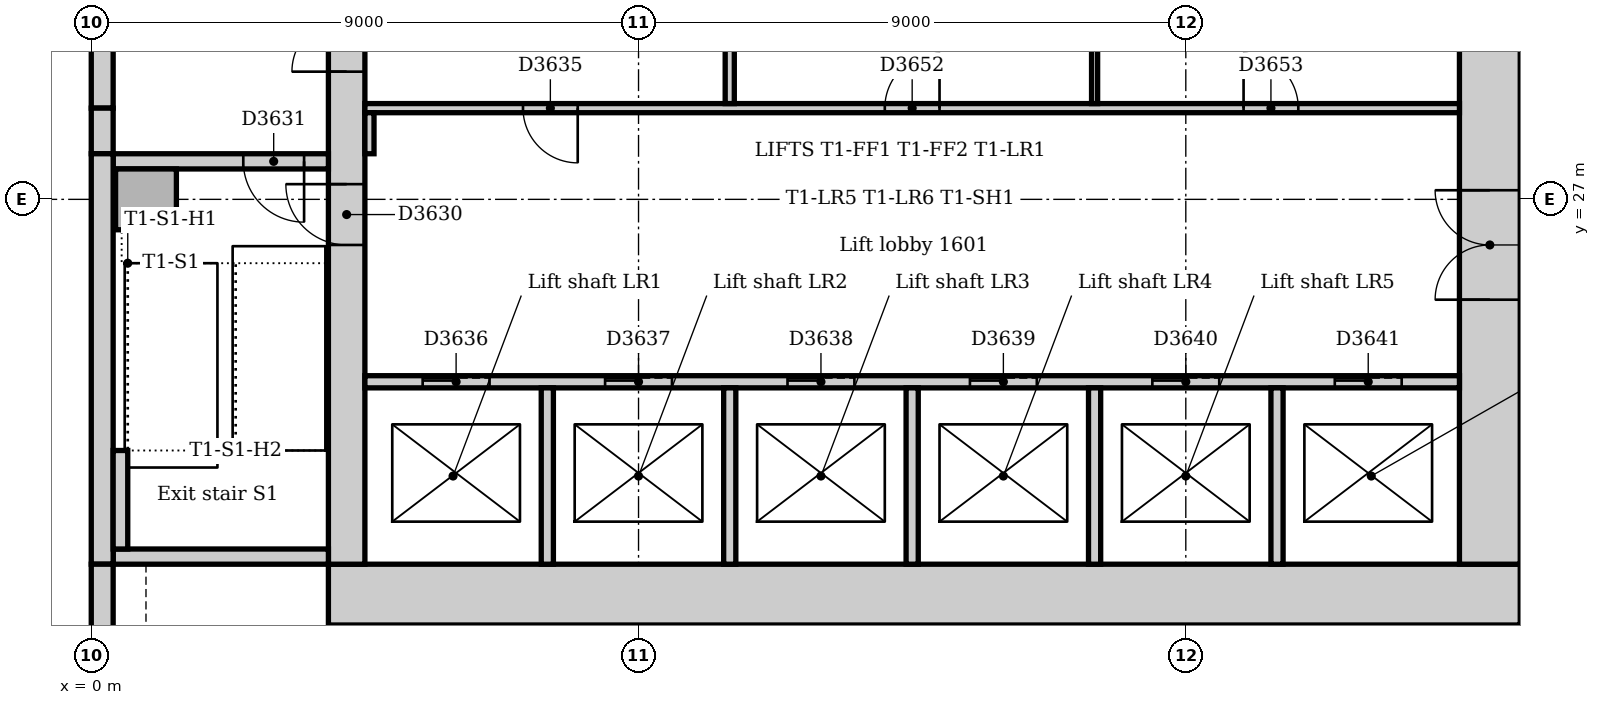
"""IFC4 building model, lengths in metres.
Left out: names, types, materials, properties, quantities, classifications, styles, units other than length and angle.
Written with IfcOpenShell. Run it as: python <this file> out.ifc"""

import sys

from ifc_helpers import new_model, si_unit, direction, frame, frame_2d, origin, origin_2d, place, context, subcontext, project, spatial, rectangle, extrude, element, fill, save


model = new_model("IFC4")
c1 = context("Model", 3, precision=1e-05, world=origin(), true_north=direction((0.0, 1.0)))
c2 = subcontext(c1, "Body", "Model", "MODEL_VIEW")
j1 = project(units=[si_unit("LENGTHUNIT", "METRE"), si_unit("PLANEANGLEUNIT", "RADIAN")], contexts=[c1])
p1 = place(None, origin())
s1 = spatial("IfcSite", under=j1, at=p1, CompositionType="ELEMENT")
p2 = place(p1, origin())
s2 = spatial("IfcBuilding", under=s1, at=p2, CompositionType="ELEMENT")
p3 = place(p2, frame((0.0, 0.0, 71.0)))
s3 = spatial("IfcBuildingStorey", under=s2, at=p3, CompositionType="ELEMENT", Elevation=71.0)
p4 = place(p3, frame((3.9, 20.5, 0.0), z_axis=(0.0, 0.0, 1.0), x_axis=(1.0, 0.0, 0.0)))
e1 = element("IfcWall", 1, at=p4, inside=s3, PredefinedType="SOLIDWALL", context=c2, shape_type="SweptSolid", body=[
    extrude(rectangle(XDim=19.6, YDim=1.0, at=frame_2d((9.8, 0.0))), origin(), (0.0, 0.0, 1.0), 4.0),
])
p5 = place(p3, frame((23.0, 21.0, 0.0), z_axis=(0.0, 0.0, 1.0), x_axis=(0.0, 1.0, 0.0)))
e2 = element("IfcWall", 2, at=p5, inside=s3, PredefinedType="SOLIDWALL", context=c2, shape_type="SweptSolid", body=[
    extrude(rectangle(XDim=10.5, YDim=1.0, at=frame_2d((5.25, 0.0))), origin(), (0.0, 0.0, 1.0), 4.0),
])
p6 = place(p5, frame((4.35, 0.0, 0.0)))
e3 = element("IfcOpeningElement", 3, at=p6, cuts=e2, PredefinedType="OPENING", context=c2, shape_type="SweptSolid", body=[
    extrude(rectangle(XDim=1.8, YDim=2.1, at=frame_2d((0.9, 1.05))), frame((0.0, 0.51, 0.0), z_axis=(0.0, -1.0, 0.0), x_axis=(1.0, 0.0, 0.0)), (0.0, 0.0, 1.0), 1.02),
])
p7 = place(p3, frame((4.2, 31.5, 0.0), z_axis=(0.0, 0.0, 1.0), x_axis=(0.0, -1.0, 0.0)))
e4 = element("IfcWall", 4, at=p7, inside=s3, PredefinedType="SOLIDWALL", context=c2, shape_type="SweptSolid", body=[
    extrude(rectangle(XDim=10.5, YDim=0.6, at=frame_2d((5.25, 0.0))), origin(), (0.0, 0.0, 1.0), 4.0),
])
p8 = place(p7, frame((4.25, 0.0, 0.0)))
e5 = element("IfcOpeningElement", 5, at=p8, cuts=e4, PredefinedType="OPENING", context=c2, shape_type="SweptSolid", body=[
    extrude(rectangle(XDim=1.0, YDim=2.1, at=frame_2d((0.5, 1.05))), frame((0.0, 0.31, 0.0), z_axis=(0.0, -1.0, 0.0), x_axis=(1.0, 0.0, 0.0)), (0.0, 0.0, 1.0), 0.62),
])
p9 = place(p7, frame((0.6, 0.0, 0.0)))
e6 = element("IfcOpeningElement", 6, at=p9, cuts=e4, PredefinedType="OPENING", context=c2, shape_type="SweptSolid", body=[
    extrude(rectangle(XDim=1.8, YDim=2.1, at=frame_2d((0.9, 1.05))), frame((0.0, 0.31, 0.0), z_axis=(0.0, -1.0, 0.0), x_axis=(1.0, 0.0, 0.0)), (0.0, 0.0, 1.0), 0.62),
])
p10 = place(p3, frame((0.36, 21.125, 0.0), z_axis=(0.0, 0.0, 1.0), x_axis=(1.0, 0.0, 0.0)))
e7 = element("IfcWall", 7, at=p10, inside=s3, PredefinedType="SOLIDWALL", context=c2, shape_type="SweptSolid", body=[
    extrude(rectangle(XDim=3.54, YDim=0.25, at=frame_2d((1.77, 0.0))), origin(), (0.0, 0.0, 1.0), 4.0),
])
p11 = place(p3, frame((3.9, 27.625, 0.0), z_axis=(0.0, 0.0, 1.0), x_axis=(-1.0, 0.0, 0.0)))
e8 = element("IfcWall", 8, at=p11, inside=s3, PredefinedType="SOLIDWALL", context=c2, shape_type="SweptSolid", body=[
    extrude(rectangle(XDim=3.54, YDim=0.25, at=frame_2d((1.77, 0.0))), origin(), (0.0, 0.0, 1.0), 4.0),
])
p12 = place(p11, frame((0.4, 0.0, 0.0)))
e9 = element("IfcOpeningElement", 9, at=p12, cuts=e8, PredefinedType="OPENING", context=c2, shape_type="SweptSolid", body=[
    extrude(rectangle(XDim=1.0, YDim=2.1, at=frame_2d((0.5, 1.05))), frame((0.0, 0.135, 0.0), z_axis=(0.0, -1.0, 0.0), x_axis=(1.0, 0.0, 0.0)), (0.0, 0.0, 1.0), 0.27),
])
p13 = place(p3, frame((0.9, 27.0, 0.0), z_axis=(0.0, 0.0, 1.0), x_axis=(1.0, 0.0, 0.0)))
e10 = element("IfcColumn", 10, at=p13, inside=s3, PredefinedType="COLUMN", context=c2, shape_type="SweptSolid", body=[
    extrude(rectangle(XDim=1.0, YDim=1.0, at=origin_2d()), origin(), (0.0, 0.0, 1.0), 4.0),
])
p14 = place(p3, frame((0.18, 34.5, 0.0), z_axis=(0.0, 0.0, 1.0), x_axis=(0.0, -1.0, 0.0)))
e11 = element("IfcWall", 11, at=p14, inside=s3, PredefinedType="STANDARD", context=c2, shape_type="SweptSolid", body=[
    extrude(rectangle(XDim=6.0, YDim=0.36, at=frame_2d((3.0, 0.0))), origin(), (0.0, 0.0, 1.0), 3.85),
])
p15 = place(p14, frame((2.1, 0.0, 0.0)))
e12 = element("IfcOpeningElement", 12, at=p15, cuts=e11, PredefinedType="OPENING", context=c2, shape_type="SweptSolid", body=[
    extrude(rectangle(XDim=1.8, YDim=2.4, at=frame_2d((0.9, 1.2))), frame((0.0, 0.19, 0.0), z_axis=(0.0, -1.0, 0.0), x_axis=(1.0, 0.0, 0.0)), (0.0, 0.0, 1.0), 0.38),
])
p16 = place(p3, frame((0.18, 28.5, 0.0), z_axis=(0.0, 0.0, 1.0), x_axis=(0.0, -1.0, 0.0)))
e13 = element("IfcWall", 13, at=p16, inside=s3, PredefinedType="STANDARD", context=c2, shape_type="SweptSolid", body=[
    extrude(rectangle(XDim=0.75, YDim=0.36, at=frame_2d((0.375, 0.0))), origin(), (0.0, 0.0, 1.0), 3.85),
])
p17 = place(p3, frame((0.18, 27.75, 0.0), z_axis=(0.0, 0.0, 1.0), x_axis=(0.0, -1.0, 0.0)))
e14 = element("IfcWall", 14, at=p17, inside=s3, PredefinedType="STANDARD", context=c2, shape_type="SweptSolid", body=[
    extrude(rectangle(XDim=6.75, YDim=0.36, at=frame_2d((3.375, 0.0))), origin(), (0.0, 0.0, 1.0), 3.85),
])
p18 = place(p3, frame((0.18, 21.0, 0.0), z_axis=(0.0, 0.0, 1.0), x_axis=(0.0, -1.0, 0.0)))
e15 = element("IfcWall", 15, at=p18, inside=s3, PredefinedType="STANDARD", context=c2, shape_type="SweptSolid", body=[
    extrude(rectangle(XDim=16.757, YDim=0.36, at=frame_2d((8.379, 0.0))), origin(), (0.0, 0.0, 1.0), 3.85),
])
p19 = place(p18, frame((1.35, 0.0, 0.9)))
e16 = element("IfcOpeningElement", 16, at=p19, cuts=e15, PredefinedType="OPENING", context=c2, shape_type="SweptSolid", body=[
    extrude(rectangle(XDim=3.3, YDim=1.6, at=frame_2d((1.65, 0.8))), frame((0.0, 0.19, 0.0), z_axis=(0.0, -1.0, 0.0), x_axis=(1.0, 0.0, 0.0)), (0.0, 0.0, 1.0), 0.38),
])
p20 = place(p18, frame((5.85, 0.0, 0.9)))
e17 = element("IfcOpeningElement", 17, at=p20, cuts=e15, PredefinedType="OPENING", context=c2, shape_type="SweptSolid", body=[
    extrude(rectangle(XDim=3.3, YDim=1.6, at=frame_2d((1.65, 0.8))), frame((0.0, 0.19, 0.0), z_axis=(0.0, -1.0, 0.0), x_axis=(1.0, 0.0, 0.0)), (0.0, 0.0, 1.0), 0.38),
])
p21 = place(p18, frame((10.35, 0.0, 0.9)))
e18 = element("IfcOpeningElement", 18, at=p21, cuts=e15, PredefinedType="OPENING", context=c2, shape_type="SweptSolid", body=[
    extrude(rectangle(XDim=3.3, YDim=1.6, at=frame_2d((1.65, 0.8))), frame((0.0, 0.19, 0.0), z_axis=(0.0, -1.0, 0.0), x_axis=(1.0, 0.0, 0.0)), (0.0, 0.0, 1.0), 0.38),
])
p22 = place(p3, frame((0.48, 21.25, 0.0), z_axis=(0.0, 0.0, 1.0), x_axis=(0.0, 1.0, 0.0)))
e19 = element("IfcWall", 19, at=p22, inside=s3, PredefinedType="STANDARD", context=c2, shape_type="SweptSolid", body=[
    extrude(rectangle(XDim=1.62, YDim=0.24, at=frame_2d((0.81, 0.0))), origin(), (0.0, 0.0, 1.0), 4.0),
])
p23 = place(p3, frame((4.5, 24.0, 0.0), z_axis=(0.0, 0.0, 1.0), x_axis=(1.0, 0.0, 0.0)))
e20 = element("IfcWall", 20, at=p23, inside=s3, PredefinedType="PARTITIONING", context=c2, shape_type="SweptSolid", body=[
    extrude(rectangle(XDim=18.0, YDim=0.2, at=frame_2d((9.0, 0.0))), origin(), (0.0, 0.0, 1.0), 3.85),
])
p24 = place(p23, frame((0.95, 0.0, 0.0)))
e21 = element("IfcOpeningElement", 21, at=p24, cuts=e20, PredefinedType="OPENING", context=c2, shape_type="SweptSolid", body=[
    extrude(rectangle(XDim=1.1, YDim=2.1, at=frame_2d((0.55, 1.05))), frame((0.0, 0.11, 0.0), z_axis=(0.0, -1.0, 0.0), x_axis=(1.0, 0.0, 0.0)), (0.0, 0.0, 1.0), 0.22),
])
p25 = place(p23, frame((3.95, 0.0, 0.0)))
e22 = element("IfcOpeningElement", 22, at=p25, cuts=e20, PredefinedType="OPENING", context=c2, shape_type="SweptSolid", body=[
    extrude(rectangle(XDim=1.1, YDim=2.1, at=frame_2d((0.55, 1.05))), frame((0.0, 0.11, 0.0), z_axis=(0.0, -1.0, 0.0), x_axis=(1.0, 0.0, 0.0)), (0.0, 0.0, 1.0), 0.22),
])
p26 = place(p23, frame((6.95, 0.0, 0.0)))
e23 = element("IfcOpeningElement", 23, at=p26, cuts=e20, PredefinedType="OPENING", context=c2, shape_type="SweptSolid", body=[
    extrude(rectangle(XDim=1.1, YDim=2.1, at=frame_2d((0.55, 1.05))), frame((0.0, 0.11, 0.0), z_axis=(0.0, -1.0, 0.0), x_axis=(1.0, 0.0, 0.0)), (0.0, 0.0, 1.0), 0.22),
])
p27 = place(p23, frame((9.95, 0.0, 0.0)))
e24 = element("IfcOpeningElement", 24, at=p27, cuts=e20, PredefinedType="OPENING", context=c2, shape_type="SweptSolid", body=[
    extrude(rectangle(XDim=1.1, YDim=2.1, at=frame_2d((0.55, 1.05))), frame((0.0, 0.11, 0.0), z_axis=(0.0, -1.0, 0.0), x_axis=(1.0, 0.0, 0.0)), (0.0, 0.0, 1.0), 0.22),
])
p28 = place(p23, frame((12.95, 0.0, 0.0)))
e25 = element("IfcOpeningElement", 25, at=p28, cuts=e20, PredefinedType="OPENING", context=c2, shape_type="SweptSolid", body=[
    extrude(rectangle(XDim=1.1, YDim=2.1, at=frame_2d((0.55, 1.05))), frame((0.0, 0.11, 0.0), z_axis=(0.0, -1.0, 0.0), x_axis=(1.0, 0.0, 0.0)), (0.0, 0.0, 1.0), 0.22),
])
p29 = place(p23, frame((15.95, 0.0, 0.0)))
e26 = element("IfcOpeningElement", 26, at=p29, cuts=e20, PredefinedType="OPENING", context=c2, shape_type="SweptSolid", body=[
    extrude(rectangle(XDim=1.1, YDim=2.1, at=frame_2d((0.55, 1.05))), frame((0.0, 0.11, 0.0), z_axis=(0.0, -1.0, 0.0), x_axis=(1.0, 0.0, 0.0)), (0.0, 0.0, 1.0), 0.22),
])
for number, where, z_axis, x_axis in (
    (27, (7.5, 21.0, 0.0), (0.0, 0.0, 1.0), (0.0, 1.0, 0.0)),
    (28, (10.5, 21.0, 0.0), (0.0, 0.0, 1.0), (0.0, 1.0, 0.0)),
    (29, (13.5, 21.0, 0.0), (0.0, 0.0, 1.0), (0.0, 1.0, 0.0)),
    (30, (16.5, 21.0, 0.0), (0.0, 0.0, 1.0), (0.0, 1.0, 0.0)),
    (31, (19.5, 21.0, 0.0), (0.0, 0.0, 1.0), (0.0, 1.0, 0.0)),
):
    element("IfcWall", number, at=place(p3, frame(where, z_axis=z_axis, x_axis=x_axis)), inside=s3, PredefinedType="PARTITIONING", context=c2, shape_type="SweptSolid", body=[
        extrude(rectangle(XDim=2.9, YDim=0.2, at=frame_2d((1.45, 0.0))), origin(), (0.0, 0.0, 1.0), 3.85),
    ])
p30 = place(p3, frame((4.5, 28.5, 0.0), z_axis=(0.0, 0.0, 1.0), x_axis=(1.0, 0.0, 0.0)))
e32 = element("IfcWall", 32, at=p30, inside=s3, PredefinedType="PARTITIONING", context=c2, shape_type="SweptSolid", body=[
    extrude(rectangle(XDim=18.0, YDim=0.15, at=frame_2d((9.0, 0.0))), origin(), (0.0, 0.0, 1.0), 3.85),
])
p31 = place(p30, frame((2.6, 0.0, 0.0)))
e33 = element("IfcOpeningElement", 33, at=p31, cuts=e32, PredefinedType="OPENING", context=c2, shape_type="SweptSolid", body=[
    extrude(rectangle(XDim=0.9, YDim=2.1, at=frame_2d((0.45, 1.05))), frame((0.0, 0.085, 0.0), z_axis=(0.0, -1.0, 0.0), x_axis=(1.0, 0.0, 0.0)), (0.0, 0.0, 1.0), 0.17),
])
p32 = place(p30, frame((8.55, 0.0, 0.0)))
e34 = element("IfcOpeningElement", 34, at=p32, cuts=e32, PredefinedType="OPENING", context=c2, shape_type="SweptSolid", body=[
    extrude(rectangle(XDim=0.9, YDim=2.1, at=frame_2d((0.45, 1.05))), frame((0.0, 0.085, 0.0), z_axis=(0.0, -1.0, 0.0), x_axis=(1.0, 0.0, 0.0)), (0.0, 0.0, 1.0), 0.17),
])
p33 = place(p30, frame((14.45, 0.0, 0.0)))
e35 = element("IfcOpeningElement", 35, at=p33, cuts=e32, PredefinedType="OPENING", context=c2, shape_type="SweptSolid", body=[
    extrude(rectangle(XDim=0.9, YDim=2.1, at=frame_2d((0.45, 1.05))), frame((0.0, 0.085, 0.0), z_axis=(0.0, -1.0, 0.0), x_axis=(1.0, 0.0, 0.0)), (0.0, 0.0, 1.0), 0.17),
])
p34 = place(p3, frame((10.5, 28.575, 0.0), z_axis=(0.0, 0.0, 1.0), x_axis=(0.0, 1.0, 0.0)))
e36 = element("IfcWall", 36, at=p34, inside=s3, PredefinedType="PARTITIONING", context=c2, shape_type="SweptSolid", body=[
    extrude(rectangle(XDim=2.675, YDim=0.15, at=frame_2d((1.337, 0.0))), origin(), (0.0, 0.0, 1.0), 3.85),
])
p35 = place(p3, frame((4.575, 27.75, 0.0), z_axis=(0.0, 0.0, 1.0), x_axis=(0.0, 1.0, 0.0)))
e37 = element("IfcWall", 37, at=p35, inside=s3, PredefinedType="PARTITIONING", context=c2, shape_type="SweptSolid", body=[
    extrude(rectangle(XDim=0.675, YDim=0.15, at=frame_2d((0.338, 0.0))), origin(), (0.0, 0.0, 1.0), 3.85),
])
p36 = place(p3, frame((16.5, 28.575, 0.0), z_axis=(0.0, 0.0, 1.0), x_axis=(0.0, 1.0, 0.0)))
e38 = element("IfcWall", 38, at=p36, inside=s3, PredefinedType="PARTITIONING", context=c2, shape_type="SweptSolid", body=[
    extrude(rectangle(XDim=2.675, YDim=0.1, at=frame_2d((1.337, 0.0))), origin(), (0.0, 0.0, 1.0), 3.85),
])
p37 = place(p8, frame((1.0, 0.0, 0.0), z_axis=(0.0, 0.0, 1.0), x_axis=(-1.0, 0.0, 0.0)))
e39 = element("IfcDoor", 39, at=p37, inside=s3, OperationType="SINGLE_SWING_RIGHT", PredefinedType="DOOR", context=c2, shape_type="SweptSolid", body=[
    extrude(rectangle(XDim=1.0, YDim=2.1, at=frame_2d((0.5, 1.05))), frame((0.0, 0.025, 0.0), z_axis=(0.0, -1.0, 0.0), x_axis=(1.0, 0.0, 0.0)), (0.0, 0.0, 1.0), 0.05),
])
fill(e5, e39)
p38 = place(p12, origin())
e40 = element("IfcDoor", 40, at=p38, inside=s3, OperationType="SINGLE_SWING_LEFT", PredefinedType="DOOR", context=c2, shape_type="SweptSolid", body=[
    extrude(rectangle(XDim=1.0, YDim=2.1, at=frame_2d((0.5, 1.05))), frame((0.0, 0.025, 0.0), z_axis=(0.0, -1.0, 0.0), x_axis=(1.0, 0.0, 0.0)), (0.0, 0.0, 1.0), 0.05),
])
fill(e9, e40)
p39 = place(p9, frame((1.8, 0.0, 0.0), z_axis=(0.0, 0.0, 1.0), x_axis=(-1.0, 0.0, 0.0)))
e41 = element("IfcDoor", 41, at=p39, inside=s3, OperationType="DOUBLE_DOOR_DOUBLE_SWING", PredefinedType="DOOR", context=c2, shape_type="SweptSolid", body=[
    extrude(rectangle(XDim=1.8, YDim=2.1, at=frame_2d((0.9, 1.05))), frame((0.0, 0.025, 0.0), z_axis=(0.0, -1.0, 0.0), x_axis=(1.0, 0.0, 0.0)), (0.0, 0.0, 1.0), 0.05),
])
fill(e6, e41)
p40 = place(p31, frame((0.9, 0.0, 0.0), z_axis=(0.0, 0.0, 1.0), x_axis=(-1.0, 0.0, 0.0)))
e42 = element("IfcDoor", 42, at=p40, inside=s3, OperationType="SINGLE_SWING_LEFT", PredefinedType="DOOR", context=c2, shape_type="SweptSolid", body=[
    extrude(rectangle(XDim=0.9, YDim=2.1, at=frame_2d((0.45, 1.05))), frame((0.0, 0.025, 0.0), z_axis=(0.0, -1.0, 0.0), x_axis=(1.0, 0.0, 0.0)), (0.0, 0.0, 1.0), 0.05),
])
fill(e33, e42)
p41 = place(p24, origin())
e43 = element("IfcDoor", 43, at=p41, inside=s3, OperationType="SLIDING_TO_LEFT", PredefinedType="DOOR", context=c2, shape_type="SweptSolid", body=[
    extrude(rectangle(XDim=1.1, YDim=2.1, at=frame_2d((0.55, 1.05))), frame((0.0, 0.025, 0.0), z_axis=(0.0, -1.0, 0.0), x_axis=(1.0, 0.0, 0.0)), (0.0, 0.0, 1.0), 0.05),
])
fill(e21, e43)
p42 = place(p25, origin())
e44 = element("IfcDoor", 44, at=p42, inside=s3, OperationType="SLIDING_TO_LEFT", PredefinedType="DOOR", context=c2, shape_type="SweptSolid", body=[
    extrude(rectangle(XDim=1.1, YDim=2.1, at=frame_2d((0.55, 1.05))), frame((0.0, 0.025, 0.0), z_axis=(0.0, -1.0, 0.0), x_axis=(1.0, 0.0, 0.0)), (0.0, 0.0, 1.0), 0.05),
])
fill(e22, e44)
p43 = place(p26, origin())
e45 = element("IfcDoor", 45, at=p43, inside=s3, OperationType="SLIDING_TO_LEFT", PredefinedType="DOOR", context=c2, shape_type="SweptSolid", body=[
    extrude(rectangle(XDim=1.1, YDim=2.1, at=frame_2d((0.55, 1.05))), frame((0.0, 0.025, 0.0), z_axis=(0.0, -1.0, 0.0), x_axis=(1.0, 0.0, 0.0)), (0.0, 0.0, 1.0), 0.05),
])
fill(e23, e45)
p44 = place(p27, origin())
e46 = element("IfcDoor", 46, at=p44, inside=s3, OperationType="SLIDING_TO_LEFT", PredefinedType="DOOR", context=c2, shape_type="SweptSolid", body=[
    extrude(rectangle(XDim=1.1, YDim=2.1, at=frame_2d((0.55, 1.05))), frame((0.0, 0.025, 0.0), z_axis=(0.0, -1.0, 0.0), x_axis=(1.0, 0.0, 0.0)), (0.0, 0.0, 1.0), 0.05),
])
fill(e24, e46)
p45 = place(p28, origin())
e47 = element("IfcDoor", 47, at=p45, inside=s3, OperationType="SLIDING_TO_LEFT", PredefinedType="DOOR", context=c2, shape_type="SweptSolid", body=[
    extrude(rectangle(XDim=1.1, YDim=2.1, at=frame_2d((0.55, 1.05))), frame((0.0, 0.025, 0.0), z_axis=(0.0, -1.0, 0.0), x_axis=(1.0, 0.0, 0.0)), (0.0, 0.0, 1.0), 0.05),
])
fill(e25, e47)
p46 = place(p29, origin())
e48 = element("IfcDoor", 48, at=p46, inside=s3, OperationType="SLIDING_TO_LEFT", PredefinedType="DOOR", context=c2, shape_type="SweptSolid", body=[
    extrude(rectangle(XDim=1.1, YDim=2.1, at=frame_2d((0.55, 1.05))), frame((0.0, 0.025, 0.0), z_axis=(0.0, -1.0, 0.0), x_axis=(1.0, 0.0, 0.0)), (0.0, 0.0, 1.0), 0.05),
])
fill(e26, e48)
p47 = place(p6, origin())
e49 = element("IfcDoor", 49, at=p47, inside=s3, OperationType="DOUBLE_DOOR_DOUBLE_SWING", PredefinedType="DOOR", context=c2, shape_type="SweptSolid", body=[
    extrude(rectangle(XDim=1.8, YDim=2.1, at=frame_2d((0.9, 1.05))), frame((0.0, 0.025, 0.0), z_axis=(0.0, -1.0, 0.0), x_axis=(1.0, 0.0, 0.0)), (0.0, 0.0, 1.0), 0.05),
])
fill(e3, e49)
p48 = place(p32, origin())
e50 = element("IfcDoor", 50, at=p48, inside=s3, OperationType="SINGLE_SWING_RIGHT", PredefinedType="DOOR", context=c2, shape_type="SweptSolid", body=[
    extrude(rectangle(XDim=0.9, YDim=2.1, at=frame_2d((0.45, 1.05))), frame((0.0, 0.025, 0.0), z_axis=(0.0, -1.0, 0.0), x_axis=(1.0, 0.0, 0.0)), (0.0, 0.0, 1.0), 0.05),
])
fill(e34, e50)
p49 = place(p33, origin())
e51 = element("IfcDoor", 51, at=p49, inside=s3, OperationType="SINGLE_SWING_LEFT", PredefinedType="DOOR", context=c2, shape_type="SweptSolid", body=[
    extrude(rectangle(XDim=0.9, YDim=2.1, at=frame_2d((0.45, 1.05))), frame((0.0, 0.025, 0.0), z_axis=(0.0, -1.0, 0.0), x_axis=(1.0, 0.0, 0.0)), (0.0, 0.0, 1.0), 0.05),
])
fill(e35, e51)
save(model, sys.argv[1])
